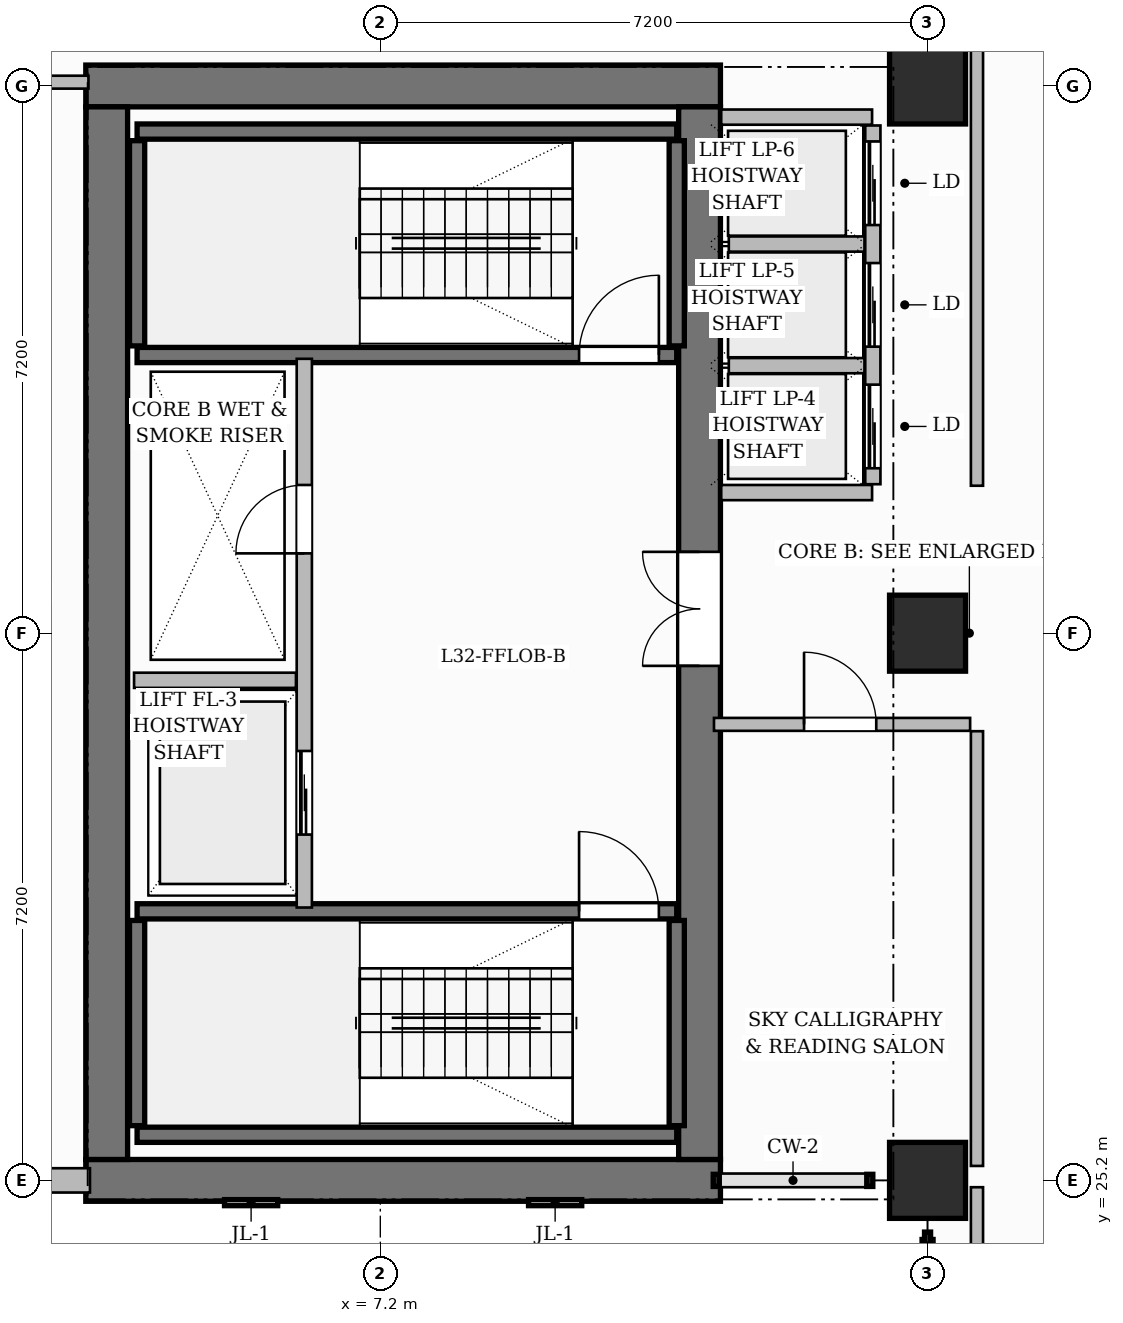
"""IFC4 building model, lengths in metres.
Left out: names, types, materials, properties, quantities, classifications, styles, units other than length and angle.
Written with IfcOpenShell. Run it as: python <this file> out.ifc"""

import sys

from ifc_helpers import new_model, si_unit, direction, frame, frame_2d, origin, origin_2d, place, context, subcontext, project, spatial, rectangle, extrude, source, transform, mapped, element, fill, save


model = new_model("IFC4")
c1 = context("Model", 3, precision=1e-05, world=origin(), true_north=direction((0.0, 1.0)))
c2 = subcontext(c1, "Body", "Model", "MODEL_VIEW")
j1 = project(units=[si_unit("LENGTHUNIT", "METRE"), si_unit("PLANEANGLEUNIT", "RADIAN")], contexts=[c1])
p1 = place(None, origin())
s1 = spatial("IfcSite", under=j1, at=p1, CompositionType="ELEMENT")
p2 = place(p1, origin())
s2 = spatial("IfcBuilding", under=s1, at=p2, CompositionType="ELEMENT")
p3 = place(p2, frame((0.0, 0.0, 130.3)))
s3 = spatial("IfcBuildingStorey", under=s2, at=p3, CompositionType="ELEMENT", Elevation=130.3)
for number, where, z_axis, x_axis in (
    (1, (3.325, 25.2, 0.0), (0.0, 0.0, 1.0), (1.0, 0.0, 0.0)),
    (2, (3.325, 39.6, 0.0), (0.0, 0.0, 1.0), (1.0, 0.0, 0.0)),
):
    element("IfcWall", number, at=place(p3, frame(where, z_axis=z_axis, x_axis=x_axis)), inside=s3, PredefinedType="SHEAR", context=c2, shape_type="SweptSolid", body=[
        extrude(rectangle(XDim=8.35, YDim=0.55, at=frame_2d((4.175, 0.0))), origin(), (0.0, 0.0, 1.0), 3.7),
    ])
p4 = place(p3, frame((3.6, 25.475, 0.0), z_axis=(0.0, 0.0, 1.0), x_axis=(0.0, 1.0, 0.0)))
e3 = element("IfcWall", 3, at=p4, inside=s3, PredefinedType="SHEAR", context=c2, shape_type="SweptSolid", body=[
    extrude(rectangle(XDim=13.85, YDim=0.55, at=frame_2d((6.925, 0.0))), origin(), (0.0, 0.0, 1.0), 3.7),
])
p5 = place(p3, frame((11.4, 25.475, 0.0), z_axis=(0.0, 0.0, 1.0), x_axis=(0.0, 1.0, 0.0)))
e4 = element("IfcWall", 4, at=p5, inside=s3, PredefinedType="SHEAR", context=c2, shape_type="SweptSolid", body=[
    extrude(rectangle(XDim=13.85, YDim=0.55, at=frame_2d((6.925, 0.0))), origin(), (0.0, 0.0, 1.0), 3.7),
])
p6 = place(p5, frame((6.495, 0.0, 0.0)))
e5 = element("IfcOpeningElement", 5, at=p6, cuts=e4, PredefinedType="OPENING", context=c2, shape_type="SweptSolid", body=[
    extrude(rectangle(XDim=1.5, YDim=2.2, at=frame_2d((0.75, 1.1))), frame((0.0, 0.285, 0.0), z_axis=(0.0, -1.0, 0.0), x_axis=(1.0, 0.0, 0.0)), (0.0, 0.0, 1.0), 0.57),
])
m1 = source(origin(), c2, "Body", "SweptSolid", [
    extrude(rectangle(XDim=1.0, YDim=1.0, at=origin_2d()), origin(), (0.0, 0.0, 1.0), 3.7),
])
for number, where, z_axis, x_axis in (
    (6, (14.4, 25.2, 0.0), (0.0, 0.0, 1.0), (1.0, 0.0, 0.0)),
    (7, (14.4, 32.4, 0.0), (0.0, 0.0, 1.0), (1.0, 0.0, 0.0)),
    (8, (14.4, 39.6, 0.0), (0.0, 0.0, 1.0), (1.0, 0.0, 0.0)),
):
    element("IfcColumn", number, at=place(p3, frame(where, z_axis=z_axis, x_axis=x_axis)), inside=s3, PredefinedType="COLUMN", context=c2, shape_type="MappedRepresentation", body=[
        mapped(m1, transform((0.0, 0.0, 0.0), scale=1.0)),
    ])
p7 = place(p3, frame((4.0, 25.8, 0.0), z_axis=(0.0, 0.0, 1.0), x_axis=(1.0, 0.0, 0.0)))
e9 = element("IfcWall", 9, at=p7, inside=s3, PredefinedType="SHEAR", context=c2, shape_type="SweptSolid", body=[
    extrude(rectangle(XDim=7.1, YDim=0.2, at=frame_2d((3.55, 0.0))), origin(), (0.0, 0.0, 1.0), 3.7),
])
for number, where, z_axis, x_axis in (
    (10, (4.0, 25.92, 0.0), (0.0, 0.0, 1.0), (0.0, 1.0, 0.0)),
    (11, (11.1, 25.92, 0.0), (0.0, 0.0, 1.0), (0.0, 1.0, 0.0)),
):
    element("IfcWall", number, at=place(p3, frame(where, z_axis=z_axis, x_axis=x_axis)), inside=s3, PredefinedType="SHEAR", context=c2, shape_type="SweptSolid", body=[
        extrude(rectangle(XDim=2.7, YDim=0.2, at=frame_2d((1.35, 0.0))), origin(), (0.0, 0.0, 1.0), 3.7),
    ])
p8 = place(p3, frame((4.0, 28.74, 0.0), z_axis=(0.0, 0.0, 1.0), x_axis=(1.0, 0.0, 0.0)))
e12 = element("IfcWall", 12, at=p8, inside=s3, PredefinedType="SHEAR", context=c2, shape_type="SweptSolid", body=[
    extrude(rectangle(XDim=7.1, YDim=0.2, at=frame_2d((3.55, 0.0))), origin(), (0.0, 0.0, 1.0), 3.7),
])
p9 = place(p8, frame((5.815, 0.0, 0.0)))
e13 = element("IfcOpeningElement", 13, at=p9, cuts=e12, PredefinedType="OPENING", context=c2, shape_type="SweptSolid", body=[
    extrude(rectangle(XDim=1.05, YDim=2.2, at=frame_2d((0.525, 1.1))), frame((0.0, 0.11, 0.0), z_axis=(0.0, -1.0, 0.0), x_axis=(1.0, 0.0, 0.0)), (0.0, 0.0, 1.0), 0.22),
])
p10 = place(p3, frame((4.0, 39.0, 0.0), z_axis=(0.0, 0.0, 1.0), x_axis=(1.0, 0.0, 0.0)))
e14 = element("IfcWall", 14, at=p10, inside=s3, PredefinedType="SHEAR", context=c2, shape_type="SweptSolid", body=[
    extrude(rectangle(XDim=7.1, YDim=0.2, at=frame_2d((3.55, 0.0))), origin(), (0.0, 0.0, 1.0), 3.7),
])
for number, where, z_axis, x_axis in (
    (15, (4.0, 36.18, 0.0), (0.0, 0.0, 1.0), (0.0, 1.0, 0.0)),
    (16, (11.1, 36.18, 0.0), (0.0, 0.0, 1.0), (0.0, 1.0, 0.0)),
):
    element("IfcWall", number, at=place(p3, frame(where, z_axis=z_axis, x_axis=x_axis)), inside=s3, PredefinedType="SHEAR", context=c2, shape_type="SweptSolid", body=[
        extrude(rectangle(XDim=2.7, YDim=0.2, at=frame_2d((1.35, 0.0))), origin(), (0.0, 0.0, 1.0), 3.7),
    ])
p11 = place(p3, frame((4.0, 36.06, 0.0), z_axis=(0.0, 0.0, 1.0), x_axis=(1.0, 0.0, 0.0)))
e17 = element("IfcWall", 17, at=p11, inside=s3, PredefinedType="SHEAR", context=c2, shape_type="SweptSolid", body=[
    extrude(rectangle(XDim=7.1, YDim=0.2, at=frame_2d((3.55, 0.0))), origin(), (0.0, 0.0, 1.0), 3.7),
])
p12 = place(p11, frame((5.815, 0.0, 0.0)))
e18 = element("IfcOpeningElement", 18, at=p12, cuts=e17, PredefinedType="OPENING", context=c2, shape_type="SweptSolid", body=[
    extrude(rectangle(XDim=1.05, YDim=2.2, at=frame_2d((0.525, 1.1))), frame((0.0, 0.11, 0.0), z_axis=(0.0, -1.0, 0.0), x_axis=(1.0, 0.0, 0.0)), (0.0, 0.0, 1.0), 0.22),
])
p13 = place(p3, frame((6.2, 28.79, 0.0), z_axis=(0.0, 0.0, 1.0), x_axis=(0.0, 1.0, 0.0)))
e19 = element("IfcWall", 19, at=p13, inside=s3, PredefinedType="PARTITIONING", context=c2, shape_type="SweptSolid", body=[
    extrude(rectangle(XDim=7.22, YDim=0.2, at=frame_2d((3.61, 0.0))), origin(), (0.0, 0.0, 1.0), 3.45),
])
p14 = place(p13, frame((4.66, 0.0, 0.0)))
e20 = element("IfcOpeningElement", 20, at=p14, cuts=e19, PredefinedType="OPENING", context=c2, shape_type="SweptSolid", body=[
    extrude(rectangle(XDim=0.9, YDim=2.1, at=frame_2d((0.45, 1.05))), frame((0.0, 0.11, 0.0), z_axis=(0.0, -1.0, 0.0), x_axis=(1.0, 0.0, 0.0)), (0.0, 0.0, 1.0), 0.22),
])
p15 = place(p13, frame((0.96, 0.0, 0.0)))
e21 = element("IfcOpeningElement", 21, at=p15, cuts=e19, PredefinedType="OPENING", context=c2, shape_type="SweptSolid", body=[
    extrude(rectangle(XDim=1.1, YDim=2.2, at=frame_2d((0.55, 1.1))), frame((0.0, 0.11, 0.0), z_axis=(0.0, -1.0, 0.0), x_axis=(1.0, 0.0, 0.0)), (0.0, 0.0, 1.0), 0.22),
])
p16 = place(p3, frame((3.96, 31.78, 0.0), z_axis=(0.0, 0.0, 1.0), x_axis=(1.0, 0.0, 0.0)))
e22 = element("IfcWall", 22, at=p16, inside=s3, PredefinedType="PARTITIONING", context=c2, shape_type="SweptSolid", body=[
    extrude(rectangle(XDim=2.13, YDim=0.2, at=frame_2d((1.065, 0.0))), origin(), (0.0, 0.0, 1.0), 3.45),
])
for number, where, z_axis, x_axis in (
    (23, (11.685, 34.25, 0.0), (0.0, 0.0, 1.0), (1.0, 0.0, 0.0)),
    (24, (11.685, 39.19, 0.0), (0.0, 0.0, 1.0), (1.0, 0.0, 0.0)),
):
    element("IfcWall", number, at=place(p3, frame(where, z_axis=z_axis, x_axis=x_axis)), inside=s3, PredefinedType="PARTITIONING", context=c2, shape_type="SweptSolid", body=[
        extrude(rectangle(XDim=1.985, YDim=0.2, at=frame_2d((0.992, 0.0))), origin(), (0.0, 0.0, 1.0), 3.45),
    ])
p17 = place(p3, frame((13.68, 34.36, 0.0), z_axis=(0.0, 0.0, 1.0), x_axis=(0.0, 1.0, 0.0)))
e25 = element("IfcWall", 25, at=p17, inside=s3, PredefinedType="PARTITIONING", context=c2, shape_type="SweptSolid", body=[
    extrude(rectangle(XDim=4.72, YDim=0.2, at=frame_2d((2.36, 0.0))), origin(), (0.0, 0.0, 1.0), 3.45),
])
p18 = place(p17, frame((0.21, 0.0, 0.0)))
e26 = element("IfcOpeningElement", 26, at=p18, cuts=e25, PredefinedType="OPENING", context=c2, shape_type="SweptSolid", body=[
    extrude(rectangle(XDim=1.1, YDim=2.2, at=frame_2d((0.55, 1.1))), frame((0.0, 0.11, 0.0), z_axis=(0.0, -1.0, 0.0), x_axis=(1.0, 0.0, 0.0)), (0.0, 0.0, 1.0), 0.22),
])
p19 = place(p17, frame((1.81, 0.0, 0.0)))
e27 = element("IfcOpeningElement", 27, at=p19, cuts=e25, PredefinedType="OPENING", context=c2, shape_type="SweptSolid", body=[
    extrude(rectangle(XDim=1.1, YDim=2.2, at=frame_2d((0.55, 1.1))), frame((0.0, 0.11, 0.0), z_axis=(0.0, -1.0, 0.0), x_axis=(1.0, 0.0, 0.0)), (0.0, 0.0, 1.0), 0.22),
])
p20 = place(p17, frame((3.41, 0.0, 0.0)))
e28 = element("IfcOpeningElement", 28, at=p20, cuts=e25, PredefinedType="OPENING", context=c2, shape_type="SweptSolid", body=[
    extrude(rectangle(XDim=1.1, YDim=2.2, at=frame_2d((0.55, 1.1))), frame((0.0, 0.11, 0.0), z_axis=(0.0, -1.0, 0.0), x_axis=(1.0, 0.0, 0.0)), (0.0, 0.0, 1.0), 0.22),
])
for number, where, z_axis, x_axis in (
    (29, (11.785, 35.92, 0.0), (0.0, 0.0, 1.0), (1.0, 0.0, 0.0)),
    (30, (11.785, 37.52, 0.0), (0.0, 0.0, 1.0), (1.0, 0.0, 0.0)),
):
    element("IfcWall", number, at=place(p3, frame(where, z_axis=z_axis, x_axis=x_axis)), inside=s3, PredefinedType="PARTITIONING", context=c2, shape_type="SweptSolid", body=[
        extrude(rectangle(XDim=1.785, YDim=0.2, at=frame_2d((0.893, 0.0))), origin(), (0.0, 0.0, 1.0), 3.45),
    ])
p21 = place(p3, frame((15.05, 11.56, 0.0), z_axis=(0.0, 0.0, 1.0), x_axis=(0.0, 1.0, 0.0)))
e31 = element("IfcWall", 31, at=p21, inside=s3, PredefinedType="PARTITIONING", context=c2, shape_type="SweptSolid", body=[
    extrude(rectangle(XDim=13.55, YDim=0.16, at=frame_2d((6.775, 0.0))), origin(), (0.0, 0.0, 1.0), 3.45),
])
p22 = place(p3, frame((0.24, 39.65, 0.0), z_axis=(0.0, 0.0, 1.0), x_axis=(1.0, 0.0, 0.0)))
e32 = element("IfcWall", 32, at=p22, inside=s3, PredefinedType="PARTITIONING", context=c2, shape_type="SweptSolid", body=[
    extrude(rectangle(XDim=3.12, YDim=0.17, at=frame_2d((1.56, 0.0))), origin(), (0.0, 0.0, 1.0), 3.45),
])
p23 = place(p22, frame((1.11, 0.0, 0.0)))
e33 = element("IfcOpeningElement", 33, at=p23, cuts=e32, PredefinedType="OPENING", context=c2, shape_type="SweptSolid", body=[
    extrude(rectangle(XDim=0.9, YDim=2.15, at=frame_2d((0.45, 1.075))), frame((0.0, 0.095, 0.0), z_axis=(0.0, -1.0, 0.0), x_axis=(1.0, 0.0, 0.0)), (0.0, 0.0, 1.0), 0.19),
])
p24 = place(p3, frame((15.05, 34.34, 0.0), z_axis=(0.0, 0.0, 1.0), x_axis=(0.0, 1.0, 0.0)))
e34 = element("IfcWall", 34, at=p24, inside=s3, PredefinedType="PARTITIONING", context=c2, shape_type="SweptSolid", body=[
    extrude(rectangle(XDim=12.292, YDim=0.16, at=frame_2d((6.146, 0.0))), origin(), (0.0, 0.0, 1.0), 3.45),
])
p25 = place(p24, frame((8.01, 0.0, 0.0)))
e35 = element("IfcOpeningElement", 35, at=p25, cuts=e34, PredefinedType="OPENING", context=c2, shape_type="SweptSolid", body=[
    extrude(rectangle(XDim=1.6, YDim=2.4, at=frame_2d((0.8, 1.2))), frame((0.0, 0.09, 0.0), z_axis=(0.0, -1.0, 0.0), x_axis=(1.0, 0.0, 0.0)), (0.0, 0.0, 1.0), 0.18),
])
p26 = place(p3, frame((15.05, 25.39, 0.0), z_axis=(0.0, 0.0, 1.0), x_axis=(0.0, 1.0, 0.0)))
e36 = element("IfcWall", 36, at=p26, inside=s3, PredefinedType="PARTITIONING", context=c2, shape_type="SweptSolid", body=[
    extrude(rectangle(XDim=5.72, YDim=0.16, at=frame_2d((2.86, 0.0))), origin(), (0.0, 0.0, 1.0), 3.45),
])
p27 = place(p3, frame((11.59, 31.2, 0.0), z_axis=(0.0, 0.0, 1.0), x_axis=(1.0, 0.0, 0.0)))
e37 = element("IfcWall", 37, at=p27, inside=s3, PredefinedType="PARTITIONING", context=c2, shape_type="SweptSolid", body=[
    extrude(rectangle(XDim=3.37, YDim=0.17, at=frame_2d((1.685, 0.0))), origin(), (0.0, 0.0, 1.0), 3.45),
])
p28 = place(p27, frame((1.185, 0.0, 0.0)))
e38 = element("IfcOpeningElement", 38, at=p28, cuts=e37, PredefinedType="OPENING", context=c2, shape_type="SweptSolid", body=[
    extrude(rectangle(XDim=0.95, YDim=2.15, at=frame_2d((0.475, 1.075))), frame((0.0, 0.095, 0.0), z_axis=(0.0, -1.0, 0.0), x_axis=(1.0, 0.0, 0.0)), (0.0, 0.0, 1.0), 0.19),
])
p29 = place(p3, frame((0.0, 25.2, 0.0), z_axis=(0.0, 0.0, 1.0), x_axis=(1.0, 0.0, 0.0)))
e39 = element("IfcWall", 39, at=p29, inside=s3, PredefinedType="SOLIDWALL", context=c2, shape_type="SweptSolid", body=[
    extrude(rectangle(XDim=3.38, YDim=0.32, at=frame_2d((1.69, 0.0))), origin(), (0.0, 0.0, 1.0), 3.45),
])
p30 = place(p29, frame((1.205, 0.0, 0.8)))
e40 = element("IfcOpeningElement", 40, at=p30, cuts=e39, PredefinedType="OPENING", context=c2, shape_type="SweptSolid", body=[
    extrude(rectangle(XDim=1.4, YDim=1.85, at=frame_2d((0.7, 0.925))), frame((0.0, 0.17, 0.0), z_axis=(0.0, -1.0, 0.0), x_axis=(1.0, 0.0, 0.0)), (0.0, 0.0, 1.0), 0.34),
])
m2 = source(origin(), c2, "Body", "SweptSolid", [
    extrude(rectangle(XDim=1.05, YDim=2.2, at=frame_2d((0.525, 1.1))), frame((0.0, 0.025, 0.0), z_axis=(0.0, -1.0, 0.0), x_axis=(1.0, 0.0, 0.0)), (0.0, 0.0, 1.0), 0.05),
])
p31 = place(p9, origin())
e41 = element("IfcDoor", 41, at=p31, inside=s3, OperationType="SINGLE_SWING_LEFT", PredefinedType="DOOR", context=c2, shape_type="MappedRepresentation", body=[
    mapped(m2, transform((0.0, 0.0, 0.0), scale=1.0)),
])
fill(e13, e41)
p32 = place(p12, origin())
e42 = element("IfcDoor", 42, at=p32, inside=s3, OperationType="SINGLE_SWING_RIGHT", PredefinedType="DOOR", context=c2, shape_type="MappedRepresentation", body=[
    mapped(m2, transform((0.0, 0.0, 0.0), scale=1.0)),
])
fill(e18, e42)
m3 = source(origin(), c2, "Body", "SweptSolid", [
    extrude(rectangle(XDim=0.9, YDim=2.1, at=frame_2d((0.45, 1.05))), frame((0.0, 0.025, 0.0), z_axis=(0.0, -1.0, 0.0), x_axis=(1.0, 0.0, 0.0)), (0.0, 0.0, 1.0), 0.05),
])
p33 = place(p14, origin())
e43 = element("IfcDoor", 43, at=p33, inside=s3, OperationType="SINGLE_SWING_LEFT", PredefinedType="DOOR", context=c2, shape_type="MappedRepresentation", body=[
    mapped(m3, transform((0.0, 0.0, 0.0), scale=1.0)),
])
fill(e20, e43)
m4 = source(origin(), c2, "Body", "SweptSolid", [
    extrude(rectangle(XDim=1.5, YDim=2.2, at=frame_2d((0.75, 1.1))), frame((0.0, 0.025, 0.0), z_axis=(0.0, -1.0, 0.0), x_axis=(1.0, 0.0, 0.0)), (0.0, 0.0, 1.0), 0.05),
])
p34 = place(p6, origin())
e44 = element("IfcDoor", 44, at=p34, inside=s3, OperationType="DOUBLE_DOOR_SINGLE_SWING", PredefinedType="DOOR", context=c2, shape_type="MappedRepresentation", body=[
    mapped(m4, transform((0.0, 0.0, 0.0), scale=1.0)),
])
fill(e5, e44)
m5 = source(origin(), c2, "Body", "SweptSolid", [
    extrude(rectangle(XDim=0.95, YDim=2.15, at=frame_2d((0.475, 1.075))), frame((0.0, 0.025, 0.0), z_axis=(0.0, -1.0, 0.0), x_axis=(1.0, 0.0, 0.0)), (0.0, 0.0, 1.0), 0.05),
])
p35 = place(p28, origin())
e45 = element("IfcDoor", 45, at=p35, inside=s3, OperationType="SINGLE_SWING_LEFT", PredefinedType="DOOR", context=c2, shape_type="MappedRepresentation", body=[
    mapped(m5, transform((0.0, 0.0, 0.0), scale=1.0)),
])
fill(e38, e45)
m6 = source(origin(), c2, "Body", "SweptSolid", [
    extrude(rectangle(XDim=1.1, YDim=2.2, at=frame_2d((0.55, 1.1))), frame((0.0, 0.025, 0.0), z_axis=(0.0, -1.0, 0.0), x_axis=(1.0, 0.0, 0.0)), (0.0, 0.0, 1.0), 0.05),
])
p36 = place(p15, origin())
e46 = element("IfcDoor", 46, at=p36, inside=s3, OperationType="SLIDING_TO_LEFT", PredefinedType="DOOR", context=c2, shape_type="MappedRepresentation", body=[
    mapped(m6, transform((0.0, 0.0, 0.0), scale=1.0)),
])
fill(e21, e46)
p37 = place(p18, origin())
e47 = element("IfcDoor", 47, at=p37, inside=s3, OperationType="SLIDING_TO_LEFT", PredefinedType="DOOR", context=c2, shape_type="MappedRepresentation", body=[
    mapped(m6, transform((0.0, 0.0, 0.0), scale=1.0)),
])
fill(e26, e47)
p38 = place(p19, origin())
e48 = element("IfcDoor", 48, at=p38, inside=s3, OperationType="SLIDING_TO_LEFT", PredefinedType="DOOR", context=c2, shape_type="MappedRepresentation", body=[
    mapped(m6, transform((0.0, 0.0, 0.0), scale=1.0)),
])
fill(e27, e48)
p39 = place(p20, origin())
e49 = element("IfcDoor", 49, at=p39, inside=s3, OperationType="SLIDING_TO_LEFT", PredefinedType="DOOR", context=c2, shape_type="MappedRepresentation", body=[
    mapped(m6, transform((0.0, 0.0, 0.0), scale=1.0)),
])
fill(e28, e49)
save(model, sys.argv[1])
